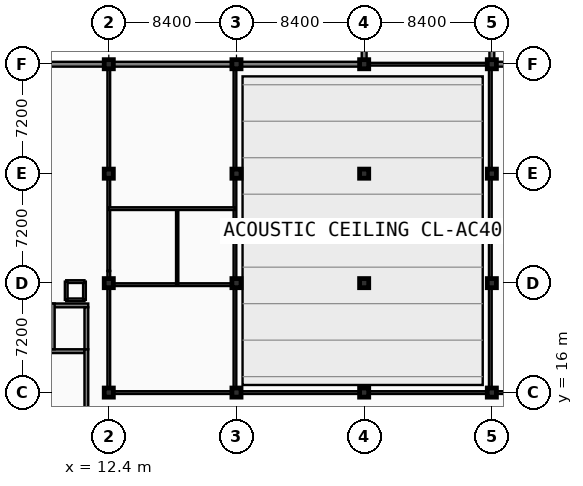
"""IFC4 building model, lengths in metres.
Left out: names, types, materials, properties, quantities, classifications, styles, units other than length and angle.
Written with IfcOpenShell. Run it as: python <this file> out.ifc"""

import sys

from ifc_helpers import new_model, si_unit, direction, frame, frame_2d, origin, origin_2d, place, context, subcontext, project, spatial, rectangle, extrude, element, fill, save


model = new_model("IFC4")
c1 = context("Model", 3, precision=1e-05, world=origin(), true_north=direction((0.0, 1.0)))
c2 = subcontext(c1, "Body", "Model", "MODEL_VIEW")
j1 = project(units=[si_unit("LENGTHUNIT", "METRE"), si_unit("PLANEANGLEUNIT", "RADIAN")], contexts=[c1])
p1 = place(None, origin())
s1 = spatial("IfcSite", under=j1, at=p1, CompositionType="ELEMENT")
p2 = place(p1, origin())
s2 = spatial("IfcBuilding", under=s1, at=p2, CompositionType="ELEMENT")
p3 = place(p2, origin())
s3 = spatial("IfcBuildingStorey", under=s2, at=p3, CompositionType="ELEMENT", Elevation=0.0)
for number, where, z_axis, x_axis in (
    (1, (12.4, 16.0, 0.0), (0.0, 0.0, 1.0), (1.0, 0.0, 0.0)),
    (2, (12.4, 23.2, 0.0), (0.0, 0.0, 1.0), (1.0, 0.0, 0.0)),
    (3, (12.4, 30.4, 0.0), (0.0, 0.0, 1.0), (1.0, 0.0, 0.0)),
    (4, (12.4, 37.6, 0.0), (0.0, 0.0, 1.0), (1.0, 0.0, 0.0)),
    (5, (20.8, 16.0, 0.0), (0.0, 0.0, 1.0), (1.0, 0.0, 0.0)),
    (6, (20.8, 23.2, 0.0), (0.0, 0.0, 1.0), (1.0, 0.0, 0.0)),
    (7, (20.8, 30.4, 0.0), (0.0, 0.0, 1.0), (1.0, 0.0, 0.0)),
    (8, (20.8, 37.6, 0.0), (0.0, 0.0, 1.0), (1.0, 0.0, 0.0)),
    (9, (29.2, 16.0, 0.0), (0.0, 0.0, 1.0), (1.0, 0.0, 0.0)),
    (10, (29.2, 23.2, 0.0), (0.0, 0.0, 1.0), (1.0, 0.0, 0.0)),
    (11, (29.2, 30.4, 0.0), (0.0, 0.0, 1.0), (1.0, 0.0, 0.0)),
    (12, (29.2, 37.6, 0.0), (0.0, 0.0, 1.0), (1.0, 0.0, 0.0)),
    (13, (37.6, 16.0, 0.0), (0.0, 0.0, 1.0), (1.0, 0.0, 0.0)),
    (14, (37.6, 23.2, 0.0), (0.0, 0.0, 1.0), (1.0, 0.0, 0.0)),
    (15, (37.6, 30.4, 0.0), (0.0, 0.0, 1.0), (1.0, 0.0, 0.0)),
    (16, (37.6, 37.6, 0.0), (0.0, 0.0, 1.0), (1.0, 0.0, 0.0)),
):
    element("IfcColumn", number, at=place(p3, frame(where, z_axis=z_axis, x_axis=x_axis)), inside=s3, PredefinedType="COLUMN", context=c2, shape_type="SweptSolid", body=[
        extrude(rectangle(XDim=0.6, YDim=0.6, at=origin_2d()), origin(), (0.0, 0.0, 1.0), 5.4),
    ])
p4 = place(p3, frame((12.4, 16.0, 0.0), z_axis=(0.0, 0.0, 1.0), x_axis=(1.0, 0.0, 0.0)))
e17 = element("IfcWall", 17, at=p4, inside=s3, PredefinedType="PARTITIONING", context=c2, shape_type="SweptSolid", body=[
    extrude(rectangle(XDim=33.45, YDim=0.18, at=frame_2d((16.725, 0.0))), origin(), (0.0, 0.0, 1.0), 3.99),
])
p5 = place(p4, frame((11.147, 0.0, -0.01)))
e18 = element("IfcOpeningElement", 18, at=p5, cuts=e17, PredefinedType="OPENING", context=c2, shape_type="SweptSolid", body=[
    extrude(rectangle(XDim=1.6, YDim=2.21, at=frame_2d((0.8, 1.105))), frame((0.0, 0.1, 0.0), z_axis=(0.0, -1.0, 0.0), x_axis=(1.0, 0.0, 0.0)), (0.0, 0.0, 1.0), 0.2),
])
p6 = place(p3, frame((12.4, 16.0, 0.0), z_axis=(0.0, 0.0, 1.0), x_axis=(0.0, 1.0, 0.0)))
e19 = element("IfcWall", 19, at=p6, inside=s3, PredefinedType="PARTITIONING", context=c2, shape_type="SweptSolid", body=[
    extrude(rectangle(XDim=8.0, YDim=0.18, at=frame_2d((4.0, 0.0))), origin(), (0.0, 0.0, 1.0), 4.54),
])
p7 = place(p6, frame((3.15, 0.0, -0.01)))
e20 = element("IfcOpeningElement", 20, at=p7, cuts=e19, PredefinedType="OPENING", context=c2, shape_type="SweptSolid", body=[
    extrude(rectangle(XDim=1.0, YDim=2.16, at=frame_2d((0.5, 1.08))), frame((0.0, 0.1, 0.0), z_axis=(0.0, -1.0, 0.0), x_axis=(1.0, 0.0, 0.0)), (0.0, 0.0, 1.0), 0.2),
])
p8 = place(p3, frame((12.4, 24.0, 0.0), z_axis=(0.0, 0.0, 1.0), x_axis=(0.0, 1.0, 0.0)))
e21 = element("IfcWall", 21, at=p8, inside=s3, PredefinedType="PARTITIONING", context=c2, shape_type="SweptSolid", body=[
    extrude(rectangle(XDim=13.45, YDim=0.18, at=frame_2d((6.725, 0.0))), origin(), (0.0, 0.0, 1.0), 4.54),
])
p9 = place(p3, frame((20.7, 16.0, 0.0), z_axis=(0.0, 0.0, 1.0), x_axis=(0.0, 1.0, 0.0)))
e22 = element("IfcWall", 22, at=p9, inside=s3, PredefinedType="PARTITIONING", context=c2, shape_type="SweptSolid", body=[
    extrude(rectangle(XDim=21.45, YDim=0.18, at=frame_2d((10.725, 0.0))), origin(), (0.0, 0.0, 1.0), 4.54),
])
p10 = place(p9, frame((7.94, 0.0, -0.01)))
e23 = element("IfcOpeningElement", 23, at=p10, cuts=e22, PredefinedType="OPENING", context=c2, shape_type="SweptSolid", body=[
    extrude(rectangle(XDim=1.6, YDim=2.21, at=frame_2d((0.8, 1.105))), frame((0.0, 0.1, 0.0), z_axis=(0.0, -1.0, 0.0), x_axis=(1.0, 0.0, 0.0)), (0.0, 0.0, 1.0), 0.2),
])
p11 = place(p3, frame((37.5, 16.0, 0.0), z_axis=(0.0, 0.0, 1.0), x_axis=(0.0, 1.0, 0.0)))
e24 = element("IfcWall", 24, at=p11, inside=s3, PredefinedType="PARTITIONING", context=c2, shape_type="SweptSolid", body=[
    extrude(rectangle(XDim=21.75, YDim=0.18, at=frame_2d((10.875, 0.0))), origin(), (0.0, 0.0, 1.0), 4.54),
])
p12 = place(p11, frame((10.075, 0.0, -0.01)))
e25 = element("IfcOpeningElement", 25, at=p12, cuts=e24, PredefinedType="OPENING", context=c2, shape_type="SweptSolid", body=[
    extrude(rectangle(XDim=1.6, YDim=2.21, at=frame_2d((0.8, 1.105))), frame((0.0, 0.1, 0.0), z_axis=(0.0, -1.0, 0.0), x_axis=(1.0, 0.0, 0.0)), (0.0, 0.0, 1.0), 0.2),
])
p13 = place(p3, frame((12.4, 23.1, 0.0), z_axis=(0.0, 0.0, 1.0), x_axis=(1.0, 0.0, 0.0)))
e26 = element("IfcWall", 26, at=p13, inside=s3, PredefinedType="PARTITIONING", context=c2, shape_type="SweptSolid", body=[
    extrude(rectangle(XDim=8.3, YDim=0.18, at=frame_2d((4.15, 0.0))), origin(), (0.0, 0.0, 1.0), 4.54),
])
p14 = place(p13, frame((1.825, 0.0, -0.01)))
e27 = element("IfcOpeningElement", 27, at=p14, cuts=e26, PredefinedType="OPENING", context=c2, shape_type="SweptSolid", body=[
    extrude(rectangle(XDim=1.0, YDim=2.16, at=frame_2d((0.5, 1.08))), frame((0.0, 0.1, 0.0), z_axis=(0.0, -1.0, 0.0), x_axis=(1.0, 0.0, 0.0)), (0.0, 0.0, 1.0), 0.2),
])
p15 = place(p3, frame((16.9, 23.1, 0.0), z_axis=(0.0, 0.0, 1.0), x_axis=(0.0, 1.0, 0.0)))
e28 = element("IfcWall", 28, at=p15, inside=s3, PredefinedType="PARTITIONING", context=c2, shape_type="SweptSolid", body=[
    extrude(rectangle(XDim=5.0, YDim=0.15, at=frame_2d((2.5, 0.0))), origin(), (0.0, 0.0, 1.0), 4.54),
])
p16 = place(p15, frame((2.0, 0.0, -0.01)))
e29 = element("IfcOpeningElement", 29, at=p16, cuts=e28, PredefinedType="OPENING", context=c2, shape_type="SweptSolid", body=[
    extrude(rectangle(XDim=1.0, YDim=2.16, at=frame_2d((0.5, 1.08))), frame((0.0, 0.085, 0.0), z_axis=(0.0, -1.0, 0.0), x_axis=(1.0, 0.0, 0.0)), (0.0, 0.0, 1.0), 0.17),
])
p17 = place(p3, frame((12.4, 28.1, 0.0), z_axis=(0.0, 0.0, 1.0), x_axis=(1.0, 0.0, 0.0)))
e30 = element("IfcWall", 30, at=p17, inside=s3, PredefinedType="PARTITIONING", context=c2, shape_type="SweptSolid", body=[
    extrude(rectangle(XDim=8.3, YDim=0.18, at=frame_2d((4.15, 0.0))), origin(), (0.0, 0.0, 1.0), 4.64),
])
p18 = place(p17, frame((2.336, 0.0, -0.01)))
e31 = element("IfcOpeningElement", 31, at=p18, cuts=e30, PredefinedType="OPENING", context=c2, shape_type="SweptSolid", body=[
    extrude(rectangle(XDim=1.0, YDim=2.16, at=frame_2d((0.5, 1.08))), frame((0.0, 0.1, 0.0), z_axis=(0.0, -1.0, 0.0), x_axis=(1.0, 0.0, 0.0)), (0.0, 0.0, 1.0), 0.2),
])
p19 = place(p3, frame((29.35, 37.6, 0.0), z_axis=(0.0, 0.0, 1.0), x_axis=(1.0, 0.0, 0.0)))
e32 = element("IfcWall", 32, at=p19, inside=s3, PredefinedType="PARTITIONING", context=c2, shape_type="SweptSolid", body=[
    extrude(rectangle(XDim=8.1, YDim=0.18, at=frame_2d((4.05, 0.0))), origin(), (0.0, 0.0, 1.0), 4.64),
])
p20 = place(p19, frame((3.15, 0.0, -0.01)))
e33 = element("IfcOpeningElement", 33, at=p20, cuts=e32, PredefinedType="OPENING", context=c2, shape_type="SweptSolid", body=[
    extrude(rectangle(XDim=1.8, YDim=2.26, at=frame_2d((0.9, 1.13))), frame((0.0, 0.1, 0.0), z_axis=(0.0, -1.0, 0.0), x_axis=(1.0, 0.0, 0.0)), (0.0, 0.0, 1.0), 0.2),
])
p21 = place(p3, frame((12.4, 37.6, 0.0), z_axis=(0.0, 0.0, 1.0), x_axis=(-1.0, 0.0, 0.0)))
e34 = element("IfcWall", 34, at=p21, inside=s3, PredefinedType="SOLIDWALL", context=c2, shape_type="SweptSolid", body=[
    extrude(rectangle(XDim=8.4, YDim=0.32, at=frame_2d((4.2, 0.0))), origin(), (0.0, 0.0, 1.0), 4.64),
])
p22 = place(p21, frame((0.46, 0.0, 0.9)))
e35 = element("IfcOpeningElement", 35, at=p22, cuts=e34, PredefinedType="OPENING", context=c2, shape_type="SweptSolid", body=[
    extrude(rectangle(XDim=2.4, YDim=2.35, at=frame_2d((1.2, 1.175))), frame((0.0, 0.17, 0.0), z_axis=(0.0, -1.0, 0.0), x_axis=(1.0, 0.0, 0.0)), (0.0, 0.0, 1.0), 0.34),
])
p23 = place(p21, frame((5.46, 0.0, 0.9)))
e36 = element("IfcOpeningElement", 36, at=p23, cuts=e34, PredefinedType="OPENING", context=c2, shape_type="SweptSolid", body=[
    extrude(rectangle(XDim=2.4, YDim=2.35, at=frame_2d((1.2, 1.175))), frame((0.0, 0.17, 0.0), z_axis=(0.0, -1.0, 0.0), x_axis=(1.0, 0.0, 0.0)), (0.0, 0.0, 1.0), 0.34),
])
p24 = place(p3, frame((20.8, 37.6, 0.0), z_axis=(0.0, 0.0, 1.0), x_axis=(-1.0, 0.0, 0.0)))
e37 = element("IfcWall", 37, at=p24, inside=s3, PredefinedType="SOLIDWALL", context=c2, shape_type="SweptSolid", body=[
    extrude(rectangle(XDim=8.4, YDim=0.32, at=frame_2d((4.2, 0.0))), origin(), (0.0, 0.0, 1.0), 4.64),
])
p25 = place(p24, frame((0.46, 0.0, 0.9)))
e38 = element("IfcOpeningElement", 38, at=p25, cuts=e37, PredefinedType="OPENING", context=c2, shape_type="SweptSolid", body=[
    extrude(rectangle(XDim=2.4, YDim=2.35, at=frame_2d((1.2, 1.175))), frame((0.0, 0.17, 0.0), z_axis=(0.0, -1.0, 0.0), x_axis=(1.0, 0.0, 0.0)), (0.0, 0.0, 1.0), 0.34),
])
p26 = place(p24, frame((5.46, 0.0, 0.9)))
e39 = element("IfcOpeningElement", 39, at=p26, cuts=e37, PredefinedType="OPENING", context=c2, shape_type="SweptSolid", body=[
    extrude(rectangle(XDim=2.4, YDim=2.35, at=frame_2d((1.2, 1.175))), frame((0.0, 0.17, 0.0), z_axis=(0.0, -1.0, 0.0), x_axis=(1.0, 0.0, 0.0)), (0.0, 0.0, 1.0), 0.34),
])
p27 = place(p3, frame((29.2, 37.6, 0.0), z_axis=(0.0, 0.0, 1.0), x_axis=(-1.0, 0.0, 0.0)))
e40 = element("IfcWall", 40, at=p27, inside=s3, PredefinedType="SOLIDWALL", context=c2, shape_type="SweptSolid", body=[
    extrude(rectangle(XDim=8.4, YDim=0.32, at=frame_2d((4.2, 0.0))), origin(), (0.0, 0.0, 1.0), 4.64),
])
p28 = place(p27, frame((3.2, 0.0, -0.01)))
e41 = element("IfcOpeningElement", 41, at=p28, cuts=e40, PredefinedType="OPENING", context=c2, shape_type="SweptSolid", body=[
    extrude(rectangle(XDim=2.0, YDim=2.41, at=frame_2d((1.0, 1.205))), frame((0.0, 0.17, 0.0), z_axis=(0.0, -1.0, 0.0), x_axis=(1.0, 0.0, 0.0)), (0.0, 0.0, 1.0), 0.34),
])
p29 = place(p3, frame((46.0, 37.6, 0.0), z_axis=(0.0, 0.0, 1.0), x_axis=(-1.0, 0.0, 0.0)))
e42 = element("IfcWall", 42, at=p29, inside=s3, PredefinedType="SOLIDWALL", context=c2, shape_type="SweptSolid", body=[
    extrude(rectangle(XDim=8.4, YDim=0.32, at=frame_2d((4.2, 0.0))), origin(), (0.0, 0.0, 1.0), 4.64),
])
p30 = place(p29, frame((0.46, 0.0, 0.9)))
e43 = element("IfcOpeningElement", 43, at=p30, cuts=e42, PredefinedType="OPENING", context=c2, shape_type="SweptSolid", body=[
    extrude(rectangle(XDim=2.4, YDim=2.35, at=frame_2d((1.2, 1.175))), frame((0.0, 0.17, 0.0), z_axis=(0.0, -1.0, 0.0), x_axis=(1.0, 0.0, 0.0)), (0.0, 0.0, 1.0), 0.34),
])
p31 = place(p29, frame((5.46, 0.0, 0.9)))
e44 = element("IfcOpeningElement", 44, at=p31, cuts=e42, PredefinedType="OPENING", context=c2, shape_type="SweptSolid", body=[
    extrude(rectangle(XDim=2.4, YDim=2.35, at=frame_2d((1.2, 1.175))), frame((0.0, 0.17, 0.0), z_axis=(0.0, -1.0, 0.0), x_axis=(1.0, 0.0, 0.0)), (0.0, 0.0, 1.0), 0.34),
])
p32 = place(p3, frame((29.2, 42.4, 0.0), z_axis=(0.0, 0.0, 1.0), x_axis=(0.0, -1.0, 0.0)))
e45 = element("IfcWall", 45, at=p32, inside=s3, PredefinedType="SOLIDWALL", context=c2, shape_type="SweptSolid", body=[
    extrude(rectangle(XDim=4.8, YDim=0.32, at=frame_2d((2.4, 0.0))), origin(), (0.0, 0.0, 1.0), 4.64),
])
p33 = place(p32, frame((1.46, 0.0, 0.9)))
e46 = element("IfcOpeningElement", 46, at=p33, cuts=e45, PredefinedType="OPENING", context=c2, shape_type="SweptSolid", body=[
    extrude(rectangle(XDim=1.8, YDim=2.2, at=frame_2d((0.9, 1.1))), frame((0.0, 0.17, 0.0), z_axis=(0.0, -1.0, 0.0), x_axis=(1.0, 0.0, 0.0)), (0.0, 0.0, 1.0), 0.34),
])
p34 = place(p3, frame((37.6, 37.6, 0.0), z_axis=(0.0, 0.0, 1.0), x_axis=(0.0, 1.0, 0.0)))
e47 = element("IfcWall", 47, at=p34, inside=s3, PredefinedType="SOLIDWALL", context=c2, shape_type="SweptSolid", body=[
    extrude(rectangle(XDim=4.8, YDim=0.32, at=frame_2d((2.4, 0.0))), origin(), (0.0, 0.0, 1.0), 4.64),
])
p35 = place(p34, frame((1.46, 0.0, 0.9)))
e48 = element("IfcOpeningElement", 48, at=p35, cuts=e47, PredefinedType="OPENING", context=c2, shape_type="SweptSolid", body=[
    extrude(rectangle(XDim=1.8, YDim=2.2, at=frame_2d((0.9, 1.1))), frame((0.0, 0.17, 0.0), z_axis=(0.0, -1.0, 0.0), x_axis=(1.0, 0.0, 0.0)), (0.0, 0.0, 1.0), 0.34),
])
p36 = place(p3, frame((10.8, 18.725, 0.0), z_axis=(0.0, 0.0, 1.0), x_axis=(-1.0, 0.0, 0.0)))
e49 = element("IfcWall", 49, at=p36, inside=s3, PredefinedType="SHEAR", context=c2, shape_type="SweptSolid", body=[
    extrude(rectangle(XDim=3.5, YDim=0.25, at=frame_2d((1.75, 0.0))), origin(), (0.0, 0.0, 1.0), 5.4),
])
p37 = place(p3, frame((10.925, 9.95, 0.0), z_axis=(0.0, 0.0, 1.0), x_axis=(0.0, 1.0, 0.0)))
e50 = element("IfcWall", 50, at=p37, inside=s3, PredefinedType="SHEAR", context=c2, shape_type="SweptSolid", body=[
    extrude(rectangle(XDim=8.9, YDim=0.25, at=frame_2d((4.45, 0.0))), origin(), (0.0, 0.0, 1.0), 5.4),
])
p38 = place(p3, frame((8.59, 21.735, 0.0), z_axis=(0.0, 0.0, 1.0), x_axis=(1.0, 0.0, 0.0)))
e51 = element("IfcWall", 51, at=p38, inside=s3, PredefinedType="SHEAR", context=c2, shape_type="SweptSolid", body=[
    extrude(rectangle(XDim=2.46, YDim=0.25, at=frame_2d((1.23, 0.0))), origin(), (0.0, 0.0, 1.0), 5.4),
])
p39 = place(p3, frame((10.925, 18.85, 0.0), z_axis=(0.0, 0.0, 1.0), x_axis=(0.0, 1.0, 0.0)))
e52 = element("IfcWall", 52, at=p39, inside=s3, PredefinedType="SHEAR", context=c2, shape_type="SweptSolid", body=[
    extrude(rectangle(XDim=2.76, YDim=0.25, at=frame_2d((1.38, 0.0))), origin(), (0.0, 0.0, 1.0), 5.4),
])
p40 = place(p39, frame((0.83, 0.0, -0.01)))
e53 = element("IfcOpeningElement", 53, at=p40, cuts=e52, PredefinedType="OPENING", context=c2, shape_type="SweptSolid", body=[
    extrude(rectangle(XDim=1.1, YDim=2.16, at=frame_2d((0.55, 1.08))), frame((0.0, 0.135, 0.0), z_axis=(0.0, -1.0, 0.0), x_axis=(1.0, 0.0, 0.0)), (0.0, 0.0, 1.0), 0.27),
])
p41 = place(p3, frame((8.715, 18.85, 0.0), z_axis=(0.0, 0.0, 1.0), x_axis=(0.0, 1.0, 0.0)))
e54 = element("IfcWall", 54, at=p41, inside=s3, PredefinedType="SHEAR", context=c2, shape_type="SweptSolid", body=[
    extrude(rectangle(XDim=3.01, YDim=0.25, at=frame_2d((1.505, 0.0))), origin(), (0.0, 0.0, 1.0), 5.4),
])
p42 = place(p3, frame((9.6, 22.1, 0.0), z_axis=(0.0, 0.0, 1.0), x_axis=(1.0, 0.0, 0.0)))
e55 = element("IfcWall", 55, at=p42, inside=s3, PredefinedType="SOLIDWALL", context=c2, shape_type="SweptSolid", body=[
    extrude(rectangle(XDim=1.2, YDim=0.18, at=frame_2d((0.6, 0.0))), origin(), (0.0, 0.0, 1.0), 5.07),
])
p43 = place(p3, frame((10.8, 22.1, 0.0), z_axis=(0.0, 0.0, 1.0), x_axis=(0.0, 1.0, 0.0)))
e56 = element("IfcWall", 56, at=p43, inside=s3, PredefinedType="SOLIDWALL", context=c2, shape_type="SweptSolid", body=[
    extrude(rectangle(XDim=1.2, YDim=0.18, at=frame_2d((0.6, 0.0))), origin(), (0.0, 0.0, 1.0), 5.07),
])
p44 = place(p43, frame((0.2, 0.0, -0.01)))
e57 = element("IfcOpeningElement", 57, at=p44, cuts=e56, PredefinedType="OPENING", context=c2, shape_type="SweptSolid", body=[
    extrude(rectangle(XDim=0.8, YDim=2.06, at=frame_2d((0.4, 1.03))), frame((0.0, 0.1, 0.0), z_axis=(0.0, -1.0, 0.0), x_axis=(1.0, 0.0, 0.0)), (0.0, 0.0, 1.0), 0.2),
])
for number, where, z_axis, x_axis in (
    (58, (10.8, 23.3, 0.0), (0.0, 0.0, 1.0), (-1.0, 0.0, 0.0)),
    (59, (9.6, 23.3, 0.0), (0.0, 0.0, 1.0), (0.0, -1.0, 0.0)),
):
    element("IfcWall", number, at=place(p3, frame(where, z_axis=z_axis, x_axis=x_axis)), inside=s3, PredefinedType="SOLIDWALL", context=c2, shape_type="SweptSolid", body=[
        extrude(rectangle(XDim=1.2, YDim=0.18, at=frame_2d((0.6, 0.0))), origin(), (0.0, 0.0, 1.0), 5.07),
    ])
p45 = place(p5, frame((0.0, 0.0, 0.01)))
e60 = element("IfcDoor", 60, at=p45, inside=s3, OperationType="DOUBLE_SWING_LEFT", PredefinedType="DOOR", context=c2, shape_type="SweptSolid", body=[
    extrude(rectangle(XDim=1.6, YDim=2.2, at=frame_2d((0.8, 1.1))), frame((0.0, 0.025, 0.0), z_axis=(0.0, -1.0, 0.0), x_axis=(1.0, 0.0, 0.0)), (0.0, 0.0, 1.0), 0.05),
])
fill(e18, e60)
p46 = place(p7, frame((1.0, 0.0, 0.01), z_axis=(0.0, 0.0, 1.0), x_axis=(-1.0, 0.0, 0.0)))
e61 = element("IfcDoor", 61, at=p46, inside=s3, OperationType="SINGLE_SWING_RIGHT", PredefinedType="DOOR", context=c2, shape_type="SweptSolid", body=[
    extrude(rectangle(XDim=1.0, YDim=2.15, at=frame_2d((0.5, 1.075))), frame((0.0, 0.025, 0.0), z_axis=(0.0, -1.0, 0.0), x_axis=(1.0, 0.0, 0.0)), (0.0, 0.0, 1.0), 0.05),
])
fill(e20, e61)
p47 = place(p10, frame((0.0, 0.0, 0.01)))
e62 = element("IfcDoor", 62, at=p47, inside=s3, OperationType="DOUBLE_SWING_LEFT", PredefinedType="DOOR", context=c2, shape_type="SweptSolid", body=[
    extrude(rectangle(XDim=1.6, YDim=2.2, at=frame_2d((0.8, 1.1))), frame((0.0, 0.025, 0.0), z_axis=(0.0, -1.0, 0.0), x_axis=(1.0, 0.0, 0.0)), (0.0, 0.0, 1.0), 0.05),
])
fill(e23, e62)
p48 = place(p12, frame((0.0, 0.0, 0.01)))
e63 = element("IfcDoor", 63, at=p48, inside=s3, OperationType="DOUBLE_SWING_LEFT", PredefinedType="DOOR", context=c2, shape_type="SweptSolid", body=[
    extrude(rectangle(XDim=1.6, YDim=2.2, at=frame_2d((0.8, 1.1))), frame((0.0, 0.025, 0.0), z_axis=(0.0, -1.0, 0.0), x_axis=(1.0, 0.0, 0.0)), (0.0, 0.0, 1.0), 0.05),
])
fill(e25, e63)
p49 = place(p14, frame((1.0, 0.0, 0.01), z_axis=(0.0, 0.0, 1.0), x_axis=(-1.0, 0.0, 0.0)))
e64 = element("IfcDoor", 64, at=p49, inside=s3, OperationType="SINGLE_SWING_LEFT", PredefinedType="DOOR", context=c2, shape_type="SweptSolid", body=[
    extrude(rectangle(XDim=1.0, YDim=2.15, at=frame_2d((0.5, 1.075))), frame((0.0, 0.025, 0.0), z_axis=(0.0, -1.0, 0.0), x_axis=(1.0, 0.0, 0.0)), (0.0, 0.0, 1.0), 0.05),
])
fill(e27, e64)
p50 = place(p16, frame((0.0, 0.0, 0.01)))
e65 = element("IfcDoor", 65, at=p50, inside=s3, OperationType="SINGLE_SWING_RIGHT", PredefinedType="DOOR", context=c2, shape_type="SweptSolid", body=[
    extrude(rectangle(XDim=1.0, YDim=2.15, at=frame_2d((0.5, 1.075))), frame((0.0, 0.025, 0.0), z_axis=(0.0, -1.0, 0.0), x_axis=(1.0, 0.0, 0.0)), (0.0, 0.0, 1.0), 0.05),
])
fill(e29, e65)
p51 = place(p18, frame((0.0, 0.0, 0.01)))
e66 = element("IfcDoor", 66, at=p51, inside=s3, OperationType="SINGLE_SWING_LEFT", PredefinedType="DOOR", context=c2, shape_type="SweptSolid", body=[
    extrude(rectangle(XDim=1.0, YDim=2.15, at=frame_2d((0.5, 1.075))), frame((0.0, 0.025, 0.0), z_axis=(0.0, -1.0, 0.0), x_axis=(1.0, 0.0, 0.0)), (0.0, 0.0, 1.0), 0.05),
])
fill(e31, e66)
p52 = place(p20, frame((1.8, 0.0, 0.01), z_axis=(0.0, 0.0, 1.0), x_axis=(-1.0, 0.0, 0.0)))
e67 = element("IfcDoor", 67, at=p52, inside=s3, OperationType="DOUBLE_SWING_LEFT", PredefinedType="DOOR", context=c2, shape_type="SweptSolid", body=[
    extrude(rectangle(XDim=1.8, YDim=2.25, at=frame_2d((0.9, 1.125))), frame((0.0, 0.025, 0.0), z_axis=(0.0, -1.0, 0.0), x_axis=(1.0, 0.0, 0.0)), (0.0, 0.0, 1.0), 0.05),
])
fill(e33, e67)
p53 = place(p22, origin())
e68 = element("IfcWindow", 68, at=p53, inside=s3, PartitioningType="TRIPLE_PANEL_VERTICAL", PredefinedType="WINDOW", context=c2, shape_type="SweptSolid", body=[
    extrude(rectangle(XDim=2.4, YDim=2.35, at=frame_2d((1.2, 1.175))), frame((0.0, 0.03, 0.0), z_axis=(0.0, -1.0, 0.0), x_axis=(1.0, 0.0, 0.0)), (0.0, 0.0, 1.0), 0.06),
])
fill(e35, e68)
p54 = place(p25, origin())
e69 = element("IfcWindow", 69, at=p54, inside=s3, PartitioningType="TRIPLE_PANEL_VERTICAL", PredefinedType="WINDOW", context=c2, shape_type="SweptSolid", body=[
    extrude(rectangle(XDim=2.4, YDim=2.35, at=frame_2d((1.2, 1.175))), frame((0.0, 0.03, 0.0), z_axis=(0.0, -1.0, 0.0), x_axis=(1.0, 0.0, 0.0)), (0.0, 0.0, 1.0), 0.06),
])
fill(e38, e69)
p55 = place(p26, origin())
e70 = element("IfcWindow", 70, at=p55, inside=s3, PartitioningType="TRIPLE_PANEL_VERTICAL", PredefinedType="WINDOW", context=c2, shape_type="SweptSolid", body=[
    extrude(rectangle(XDim=2.4, YDim=2.35, at=frame_2d((1.2, 1.175))), frame((0.0, 0.03, 0.0), z_axis=(0.0, -1.0, 0.0), x_axis=(1.0, 0.0, 0.0)), (0.0, 0.0, 1.0), 0.06),
])
fill(e39, e70)
p56 = place(p28, frame((0.0, 0.0, 0.01)))
e71 = element("IfcDoor", 71, at=p56, inside=s3, OperationType="DOUBLE_SWING_LEFT", PredefinedType="DOOR", context=c2, shape_type="SweptSolid", body=[
    extrude(rectangle(XDim=2.0, YDim=2.4, at=frame_2d((1.0, 1.2))), frame((0.0, 0.025, 0.0), z_axis=(0.0, -1.0, 0.0), x_axis=(1.0, 0.0, 0.0)), (0.0, 0.0, 1.0), 0.05),
])
fill(e41, e71)
p57 = place(p31, origin())
e72 = element("IfcWindow", 72, at=p57, inside=s3, PartitioningType="TRIPLE_PANEL_VERTICAL", PredefinedType="WINDOW", context=c2, shape_type="SweptSolid", body=[
    extrude(rectangle(XDim=2.4, YDim=2.35, at=frame_2d((1.2, 1.175))), frame((0.0, 0.03, 0.0), z_axis=(0.0, -1.0, 0.0), x_axis=(1.0, 0.0, 0.0)), (0.0, 0.0, 1.0), 0.06),
])
fill(e44, e72)
p58 = place(p40, frame((0.0, 0.0, 0.01)))
e73 = element("IfcDoor", 73, at=p58, inside=s3, OperationType="SLIDING_TO_LEFT", PredefinedType="DOOR", context=c2, shape_type="SweptSolid", body=[
    extrude(rectangle(XDim=1.1, YDim=2.15, at=frame_2d((0.55, 1.075))), frame((0.0, 0.025, 0.0), z_axis=(0.0, -1.0, 0.0), x_axis=(1.0, 0.0, 0.0)), (0.0, 0.0, 1.0), 0.05),
])
fill(e53, e73)
p59 = place(p44, frame((0.0, 0.0, 0.01)))
e74 = element("IfcDoor", 74, at=p59, inside=s3, OperationType="SINGLE_SWING_RIGHT", PredefinedType="DOOR", context=c2, shape_type="SweptSolid", body=[
    extrude(rectangle(XDim=0.8, YDim=2.05, at=frame_2d((0.4, 1.025))), frame((0.0, 0.025, 0.0), z_axis=(0.0, -1.0, 0.0), x_axis=(1.0, 0.0, 0.0)), (0.0, 0.0, 1.0), 0.05),
])
fill(e57, e74)
save(model, sys.argv[1])
